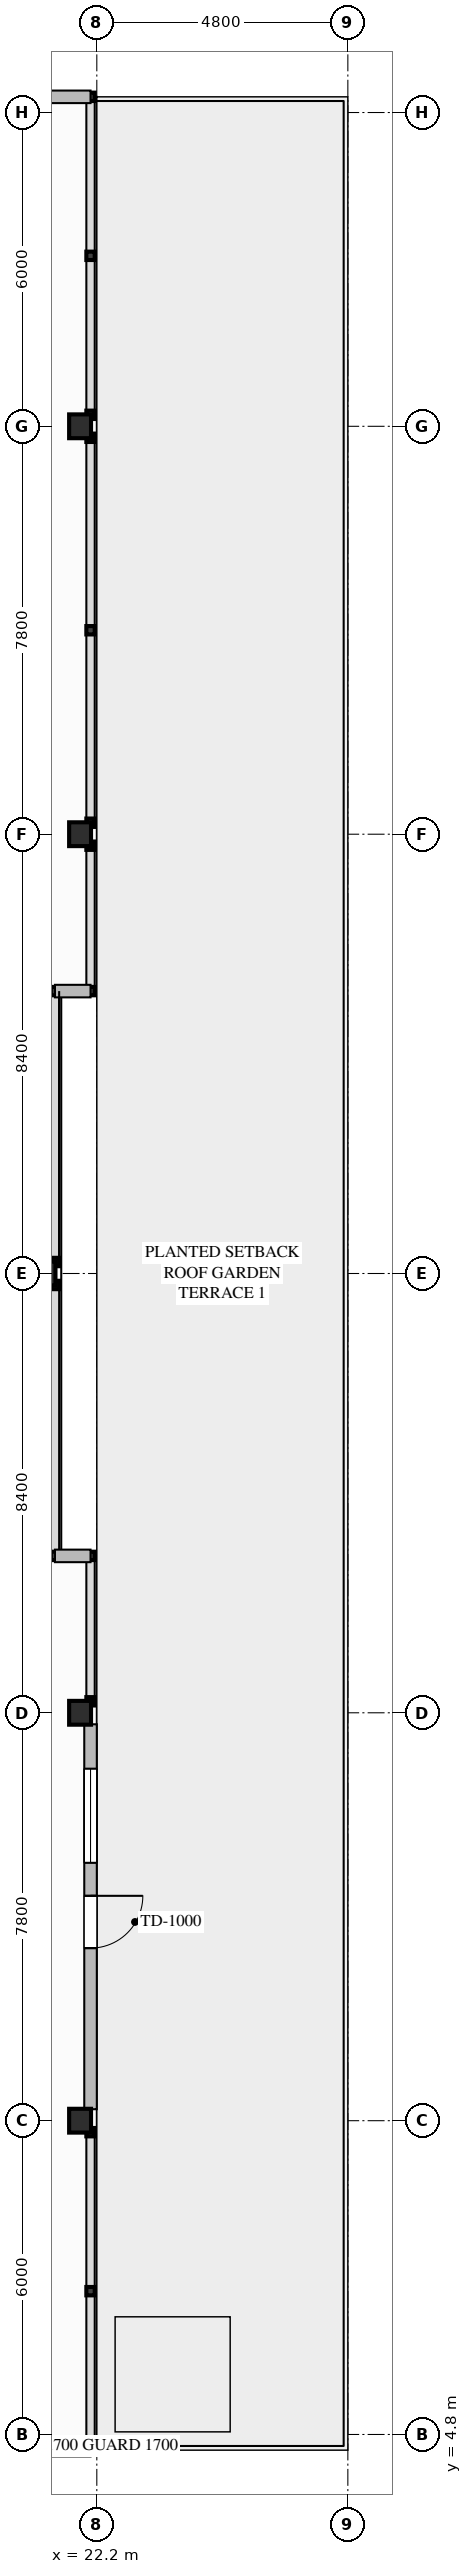
"""IFC4 building model, lengths in metres.
Left out: names, types, materials, properties, quantities, classifications, styles, units other than length and angle.
Written with IfcOpenShell. Run it as: python <this file> out.ifc"""

import sys

from ifc_helpers import new_model, si_unit, direction, frame, frame_2d, origin, origin_2d, place, context, subcontext, project, spatial, rectangle, i_section, extrude, element, fill, save


model = new_model("IFC4")
c1 = context("Model", 3, precision=1e-05, world=origin(), true_north=direction((0.0, 1.0)))
c2 = subcontext(c1, "Body", "Model", "MODEL_VIEW")
j1 = project(units=[si_unit("LENGTHUNIT", "METRE"), si_unit("PLANEANGLEUNIT", "RADIAN")], contexts=[c1])
p1 = place(None, origin())
s1 = spatial("IfcSite", under=j1, at=p1, CompositionType="ELEMENT")
p2 = place(p1, origin())
s2 = spatial("IfcBuilding", under=s1, at=p2, CompositionType="ELEMENT")
p3 = place(p2, frame((0.0, 0.0, 87.2)))
s3 = spatial("IfcBuildingStorey", under=s2, at=p3, CompositionType="ELEMENT", Elevation=87.2)
for number, where, z_axis, x_axis in (
    (1, (21.88, 10.8, -0.3), (0.0, 0.0, 1.0), (1.0, 0.0, 0.0)),
    (2, (21.88, 18.6, -0.3), (0.0, 0.0, 1.0), (1.0, 0.0, 0.0)),
    (3, (21.2, 27.0, -0.3), (0.0, 0.0, 1.0), (1.0, 0.0, 0.0)),
    (4, (21.88, 35.4, -0.3), (0.0, 0.0, 1.0), (1.0, 0.0, 0.0)),
    (5, (21.88, 43.2, -0.3), (0.0, 0.0, 1.0), (1.0, 0.0, 0.0)),
):
    element("IfcColumn", number, at=place(p3, frame(where, z_axis=z_axis, x_axis=x_axis)), inside=s3, PredefinedType="COLUMN", context=c2, shape_type="SweptSolid", body=[
        extrude(i_section(OverallWidth=0.418, OverallDepth=0.455, WebThickness=0.042, FlangeThickness=0.068, FilletRadius=0.03, at=origin_2d()), origin(), (0.0, 0.0, 1.0), 4.897),
    ])
p4 = place(p3, frame((22.08, 18.38, 0.0), z_axis=(0.0, 0.0, 1.0), x_axis=(0.0, -1.0, 0.0)))
e6 = element("IfcWall", 6, at=p4, inside=s3, PredefinedType="STANDARD", context=c2, shape_type="SweptSolid", body=[
    extrude(rectangle(XDim=7.361, YDim=0.24, at=frame_2d((3.68, 0.0))), origin(), (0.0, 0.0, 1.0), 3.729),
])
p5 = place(p4, frame((3.281, 0.0, 0.0)))
e7 = element("IfcOpeningElement", 7, at=p5, cuts=e6, PredefinedType="OPENING", context=c2, shape_type="SweptSolid", body=[
    extrude(rectangle(XDim=1.0, YDim=2.2, at=frame_2d((0.5, 1.1))), frame((0.0, 0.13, 0.0), z_axis=(0.0, -1.0, 0.0), x_axis=(1.0, 0.0, 0.0)), (0.0, 0.0, 1.0), 0.26),
])
p6 = place(p4, frame((0.849, 0.0, 0.75)))
e8 = element("IfcOpeningElement", 8, at=p6, cuts=e6, PredefinedType="OPENING", context=c2, shape_type="SweptSolid", body=[
    extrude(rectangle(XDim=1.8, YDim=2.05, at=frame_2d((0.9, 1.025))), frame((0.0, 0.13, 0.0), z_axis=(0.0, -1.0, 0.0), x_axis=(1.0, 0.0, 0.0)), (0.0, 0.0, 1.0), 0.26),
])
for number, where, z_axis, x_axis in (
    (9, (17.7, 49.5, 0.0), (0.0, 0.0, 1.0), (1.0, 0.0, 0.0)),
    (10, (22.08, 4.5, 0.0), (0.0, 0.0, 1.0), (-1.0, 0.0, 0.0)),
):
    element("IfcWall", number, at=place(p3, frame(where, z_axis=z_axis, x_axis=x_axis)), inside=s3, PredefinedType="STANDARD", context=c2, shape_type="SweptSolid", body=[
        extrude(rectangle(XDim=4.38, YDim=0.24, at=frame_2d((2.19, 0.0))), origin(), (0.0, 0.0, 1.0), 4.34),
    ])
for number, where, z_axis, x_axis in (
    (11, (22.08, 32.4, 0.0), (0.0, 0.0, 1.0), (-1.0, 0.0, 0.0)),
    (12, (21.4, 21.6, 0.0), (0.0, 0.0, 1.0), (1.0, 0.0, 0.0)),
):
    element("IfcWall", number, at=place(p3, frame(where, z_axis=z_axis, x_axis=x_axis)), inside=s3, PredefinedType="STANDARD", context=c2, shape_type="SweptSolid", body=[
        extrude(rectangle(XDim=0.68, YDim=0.24, at=frame_2d((0.34, 0.0))), origin(), (0.0, 0.0, 1.0), 4.34),
    ])
p7 = place(p5, origin())
e13 = element("IfcDoor", 13, at=p7, inside=s3, OperationType="SINGLE_SWING_LEFT", PredefinedType="DOOR", context=c2, shape_type="SweptSolid", body=[
    extrude(rectangle(XDim=1.0, YDim=2.2, at=frame_2d((0.5, 1.1))), frame((0.0, 0.025, 0.0), z_axis=(0.0, -1.0, 0.0), x_axis=(1.0, 0.0, 0.0)), (0.0, 0.0, 1.0), 0.05),
])
fill(e7, e13)
p8 = place(p6, origin())
e14 = element("IfcWindow", 14, at=p8, inside=s3, PartitioningType="SINGLE_PANEL", PredefinedType="WINDOW", context=c2, shape_type="SweptSolid", body=[
    extrude(rectangle(XDim=1.8, YDim=2.05, at=frame_2d((0.9, 1.025))), frame((0.0, 0.03, 0.0), z_axis=(0.0, -1.0, 0.0), x_axis=(1.0, 0.0, 0.0)), (0.0, 0.0, 1.0), 0.06),
])
fill(e8, e14)
save(model, sys.argv[1])
